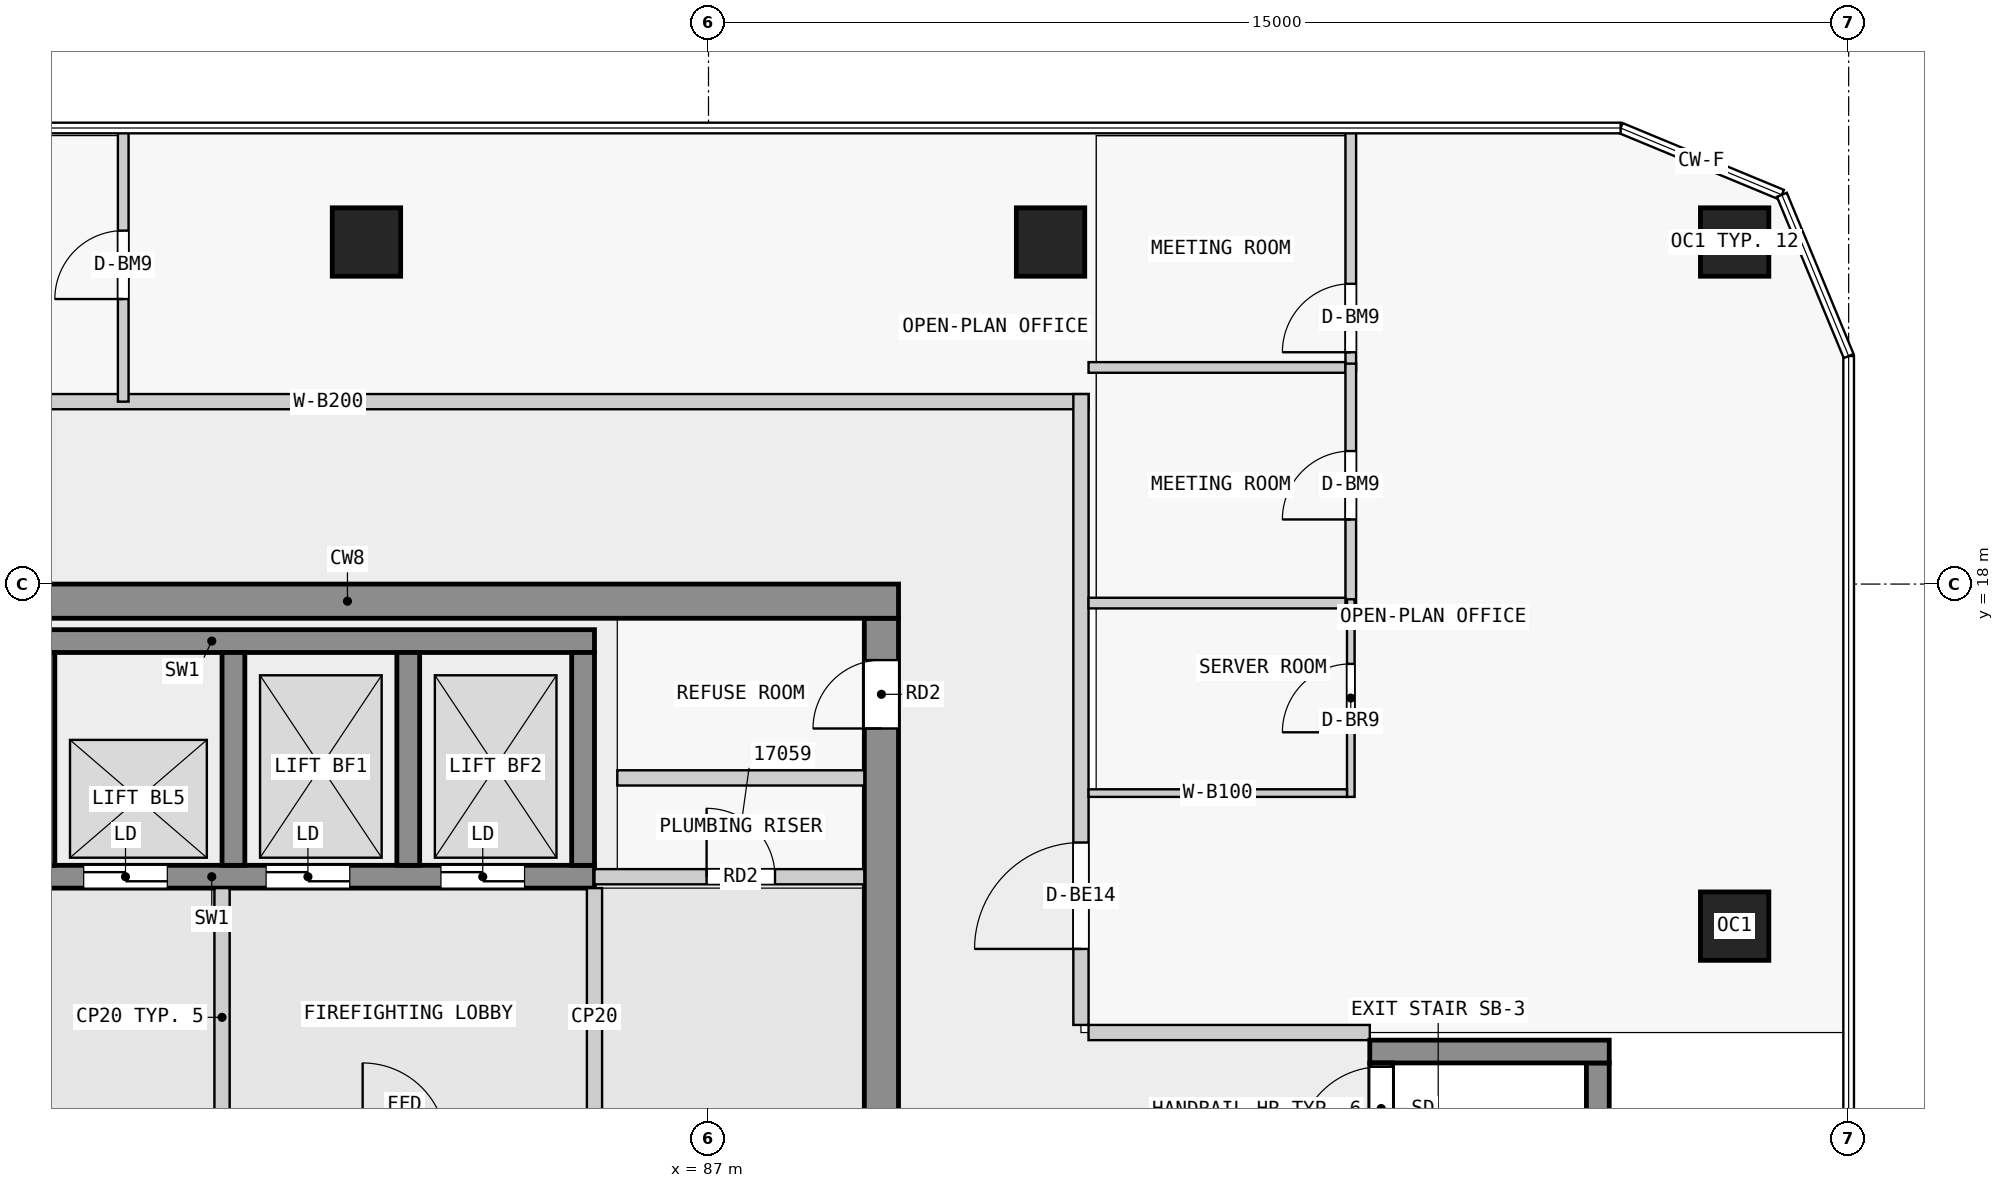
"""IFC4 building model, lengths in metres.
Left out: names, types, materials, properties, quantities, classifications, styles, units other than length and angle.
Written with IfcOpenShell. Run it as: python <this file> out.ifc"""

import sys

from ifc_helpers import new_model, si_unit, direction, frame, frame_2d, origin, origin_2d, place, context, subcontext, project, spatial, rectangle, extrude, element, fill, save


model = new_model("IFC4")
c1 = context("Model", 3, precision=1e-05, world=origin(), true_north=direction((0.0, 1.0)))
c2 = subcontext(c1, "Body", "Model", "MODEL_VIEW")
j1 = project(units=[si_unit("LENGTHUNIT", "METRE"), si_unit("PLANEANGLEUNIT", "RADIAN")], contexts=[c1])
p1 = place(None, origin())
s1 = spatial("IfcSite", under=j1, at=p1, CompositionType="ELEMENT")
p2 = place(p1, origin())
s2 = spatial("IfcBuilding", under=s1, at=p2, CompositionType="ELEMENT")
p3 = place(p2, frame((0.0, 0.0, 68.8)))
s3 = spatial("IfcBuildingStorey", under=s2, at=p3, CompositionType="ELEMENT", Elevation=68.8)
for number, where, z_axis, x_axis in (
    (1, (100.5, 13.5, 0.0), (0.0, 0.0, 1.0), (1.0, 0.0, 0.0)),
    (2, (100.5, 22.5, 0.0), (0.0, 0.0, 1.0), (1.0, 0.0, 0.0)),
    (3, (91.5, 22.5, 0.0), (0.0, 0.0, 1.0), (1.0, 0.0, 0.0)),
    (4, (82.5, 22.5, 0.0), (0.0, 0.0, 1.0), (1.0, 0.0, 0.0)),
):
    element("IfcColumn", number, at=place(p3, frame(where, z_axis=z_axis, x_axis=x_axis)), inside=s3, PredefinedType="COLUMN", context=c2, shape_type="SweptSolid", body=[
        extrude(rectangle(XDim=0.9, YDim=0.9, at=origin_2d()), origin(), (0.0, 0.0, 1.0), 3.5),
    ])
p4 = place(p3, frame((75.0, 17.775, 0.0), z_axis=(0.0, 0.0, 1.0), x_axis=(1.0, 0.0, 0.0)))
e5 = element("IfcWall", 5, at=p4, inside=s3, PredefinedType="SHEAR", context=c2, shape_type="SweptSolid", body=[
    extrude(rectangle(XDim=14.5, YDim=0.45, at=frame_2d((7.25, 0.0))), origin(), (0.0, 0.0, 1.0), 3.2),
])
p5 = place(p3, frame((89.275, 0.45, 0.0), z_axis=(0.0, 0.0, 1.0), x_axis=(0.0, 1.0, 0.0)))
e6 = element("IfcWall", 6, at=p5, inside=s3, PredefinedType="SHEAR", context=c2, shape_type="SweptSolid", body=[
    extrude(rectangle(XDim=17.1, YDim=0.45, at=frame_2d((8.55, 0.0))), origin(), (0.0, 0.0, 1.0), 3.2),
])
p6 = place(p5, frame((7.65, 0.0, 0.0)))
e7 = element("IfcOpeningElement", 7, at=p6, cuts=e6, PredefinedType="OPENING", context=c2, shape_type="SweptSolid", body=[
    extrude(rectangle(XDim=1.8, YDim=2.1, at=frame_2d((0.9, 1.05))), frame((0.0, 0.235, 0.0), z_axis=(0.0, -1.0, 0.0), x_axis=(1.0, 0.0, 0.0)), (0.0, 0.0, 1.0), 0.47),
])
p7 = place(p5, frame((15.65, 0.0, 0.0)))
e8 = element("IfcOpeningElement", 8, at=p7, cuts=e6, PredefinedType="OPENING", context=c2, shape_type="SweptSolid", body=[
    extrude(rectangle(XDim=0.9, YDim=2.1, at=frame_2d((0.45, 1.05))), frame((0.0, 0.235, 0.0), z_axis=(0.0, -1.0, 0.0), x_axis=(1.0, 0.0, 0.0)), (0.0, 0.0, 1.0), 0.47),
])
p8 = place(p3, frame((75.43, 17.25, 0.0), z_axis=(0.0, 0.0, 1.0), x_axis=(1.0, 0.0, 0.0)))
e9 = element("IfcWall", 9, at=p8, inside=s3, PredefinedType="SHEAR", context=c2, shape_type="SweptSolid", body=[
    extrude(rectangle(XDim=10.07, YDim=0.3, at=frame_2d((5.035, 0.0))), origin(), (0.0, 0.0, 1.0), 3.2),
])
p9 = place(p3, frame((75.43, 14.15, 0.0), z_axis=(0.0, 0.0, 1.0), x_axis=(1.0, 0.0, 0.0)))
e10 = element("IfcWall", 10, at=p9, inside=s3, PredefinedType="SHEAR", context=c2, shape_type="SweptSolid", body=[
    extrude(rectangle(XDim=10.07, YDim=0.3, at=frame_2d((5.035, 0.0))), origin(), (0.0, 0.0, 1.0), 3.2),
])
p10 = place(p9, frame((0.85, 0.0, 0.0)))
e11 = element("IfcOpeningElement", 11, at=p10, cuts=e10, PredefinedType="OPENING", context=c2, shape_type="SweptSolid", body=[
    extrude(rectangle(XDim=1.1, YDim=2.1, at=frame_2d((0.55, 1.05))), frame((0.0, 0.16, 0.0), z_axis=(0.0, -1.0, 0.0), x_axis=(1.0, 0.0, 0.0)), (0.0, 0.0, 1.0), 0.32),
])
p11 = place(p9, frame((3.35, 0.0, 0.0)))
e12 = element("IfcOpeningElement", 12, at=p11, cuts=e10, PredefinedType="OPENING", context=c2, shape_type="SweptSolid", body=[
    extrude(rectangle(XDim=1.1, YDim=2.1, at=frame_2d((0.55, 1.05))), frame((0.0, 0.16, 0.0), z_axis=(0.0, -1.0, 0.0), x_axis=(1.0, 0.0, 0.0)), (0.0, 0.0, 1.0), 0.32),
])
p12 = place(p9, frame((5.75, 0.0, 0.0)))
e13 = element("IfcOpeningElement", 13, at=p12, cuts=e10, PredefinedType="OPENING", context=c2, shape_type="SweptSolid", body=[
    extrude(rectangle(XDim=1.1, YDim=2.1, at=frame_2d((0.55, 1.05))), frame((0.0, 0.16, 0.0), z_axis=(0.0, -1.0, 0.0), x_axis=(1.0, 0.0, 0.0)), (0.0, 0.0, 1.0), 0.32),
])
p13 = place(p9, frame((8.05, 0.0, 0.0)))
e14 = element("IfcOpeningElement", 14, at=p13, cuts=e10, PredefinedType="OPENING", context=c2, shape_type="SweptSolid", body=[
    extrude(rectangle(XDim=1.1, YDim=2.1, at=frame_2d((0.55, 1.05))), frame((0.0, 0.16, 0.0), z_axis=(0.0, -1.0, 0.0), x_axis=(1.0, 0.0, 0.0)), (0.0, 0.0, 1.0), 0.32),
])
for number, where, z_axis, x_axis in (
    (15, (78.25, 14.3, 0.0), (0.0, 0.0, 1.0), (0.0, 1.0, 0.0)),
    (16, (80.75, 14.3, 0.0), (0.0, 0.0, 1.0), (0.0, 1.0, 0.0)),
    (17, (83.05, 14.3, 0.0), (0.0, 0.0, 1.0), (0.0, 1.0, 0.0)),
    (18, (85.35, 14.3, 0.0), (0.0, 0.0, 1.0), (0.0, 1.0, 0.0)),
):
    element("IfcWall", number, at=place(p3, frame(where, z_axis=z_axis, x_axis=x_axis)), inside=s3, PredefinedType="SHEAR", context=c2, shape_type="SweptSolid", body=[
        extrude(rectangle(XDim=2.8, YDim=0.3, at=frame_2d((1.4, 0.0))), origin(), (0.0, 0.0, 1.0), 3.2),
    ])
p14 = place(p3, frame((95.85, 5.3, 0.0), z_axis=(0.0, 0.0, 1.0), x_axis=(0.0, 1.0, 0.0)))
e19 = element("IfcWall", 19, at=p14, inside=s3, PredefinedType="SHEAR", context=c2, shape_type="SweptSolid", body=[
    extrude(rectangle(XDim=6.4, YDim=0.3, at=frame_2d((3.2, 0.0))), origin(), (0.0, 0.0, 1.0), 3.2),
])
p15 = place(p14, frame((5.25, 0.0, 0.0)))
e20 = element("IfcOpeningElement", 20, at=p15, cuts=e19, PredefinedType="OPENING", context=c2, shape_type="SweptSolid", body=[
    extrude(rectangle(XDim=1.1, YDim=2.1, at=frame_2d((0.55, 1.05))), frame((0.0, 0.16, 0.0), z_axis=(0.0, -1.0, 0.0), x_axis=(1.0, 0.0, 0.0)), (0.0, 0.0, 1.0), 0.32),
])
p16 = place(p3, frame((98.7, 5.3, 0.0), z_axis=(0.0, 0.0, 1.0), x_axis=(0.0, 1.0, 0.0)))
e21 = element("IfcWall", 21, at=p16, inside=s3, PredefinedType="SHEAR", context=c2, shape_type="SweptSolid", body=[
    extrude(rectangle(XDim=6.4, YDim=0.3, at=frame_2d((3.2, 0.0))), origin(), (0.0, 0.0, 1.0), 3.2),
])
p17 = place(p3, frame((95.7, 11.85, 0.0), z_axis=(0.0, 0.0, 1.0), x_axis=(1.0, 0.0, 0.0)))
e22 = element("IfcWall", 22, at=p17, inside=s3, PredefinedType="SHEAR", context=c2, shape_type="SweptSolid", body=[
    extrude(rectangle(XDim=3.15, YDim=0.3, at=frame_2d((1.575, 0.0))), origin(), (0.0, 0.0, 1.0), 3.2),
])
for number, where, z_axis, x_axis in (
    (23, (80.6, 10.6, 0.0), (0.0, 0.0, 1.0), (0.0, 1.0, 0.0)),
    (24, (85.5, 10.6, 0.0), (0.0, 0.0, 1.0), (0.0, 1.0, 0.0)),
):
    element("IfcWall", number, at=place(p3, frame(where, z_axis=z_axis, x_axis=x_axis)), inside=s3, PredefinedType="PARTITIONING", context=c2, shape_type="SweptSolid", body=[
        extrude(rectangle(XDim=3.4, YDim=0.2, at=frame_2d((1.7, 0.0))), origin(), (0.0, 0.0, 1.0), 3.2),
    ])
p18 = place(p3, frame((85.5, 14.15, 0.0), z_axis=(0.0, 0.0, 1.0), x_axis=(1.0, 0.0, 0.0)))
e25 = element("IfcWall", 25, at=p18, inside=s3, PredefinedType="PARTITIONING", context=c2, shape_type="SweptSolid", body=[
    extrude(rectangle(XDim=3.55, YDim=0.2, at=frame_2d((1.775, 0.0))), origin(), (0.0, 0.0, 1.0), 3.2),
])
p19 = place(p18, frame((1.475, 0.0, 0.0)))
e26 = element("IfcOpeningElement", 26, at=p19, cuts=e25, PredefinedType="OPENING", context=c2, shape_type="SweptSolid", body=[
    extrude(rectangle(XDim=0.9, YDim=2.1, at=frame_2d((0.45, 1.05))), frame((0.0, 0.11, 0.0), z_axis=(0.0, -1.0, 0.0), x_axis=(1.0, 0.0, 0.0)), (0.0, 0.0, 1.0), 0.22),
])
p20 = place(p3, frame((85.8, 15.45, 0.0), z_axis=(0.0, 0.0, 1.0), x_axis=(1.0, 0.0, 0.0)))
e27 = element("IfcWall", 27, at=p20, inside=s3, PredefinedType="PARTITIONING", context=c2, shape_type="SweptSolid", body=[
    extrude(rectangle(XDim=3.25, YDim=0.2, at=frame_2d((1.625, 0.0))), origin(), (0.0, 0.0, 1.0), 3.2),
])
p21 = place(p3, frame((72.0, 20.4, 0.0), z_axis=(0.0, 0.0, 1.0), x_axis=(1.0, 0.0, 0.0)))
e28 = element("IfcWall", 28, at=p21, inside=s3, PredefinedType="PARTITIONING", context=c2, shape_type="SweptSolid", body=[
    extrude(rectangle(XDim=20.0, YDim=0.2, at=frame_2d((10.0, 0.0))), origin(), (0.0, 0.0, 1.0), 3.2),
])
p22 = place(p3, frame((91.9, 12.2, 0.0), z_axis=(0.0, 0.0, 1.0), x_axis=(0.0, 1.0, 0.0)))
e29 = element("IfcWall", 29, at=p22, inside=s3, PredefinedType="PARTITIONING", context=c2, shape_type="SweptSolid", body=[
    extrude(rectangle(XDim=8.3, YDim=0.2, at=frame_2d((4.15, 0.0))), origin(), (0.0, 0.0, 1.0), 3.2),
])
p23 = place(p22, frame((1.0, 0.0, 0.0)))
e30 = element("IfcOpeningElement", 30, at=p23, cuts=e29, PredefinedType="OPENING", context=c2, shape_type="SweptSolid", body=[
    extrude(rectangle(XDim=1.4, YDim=2.4, at=frame_2d((0.7, 1.2))), frame((0.0, 0.11, 0.0), z_axis=(0.0, -1.0, 0.0), x_axis=(1.0, 0.0, 0.0)), (0.0, 0.0, 1.0), 0.22),
])
p24 = place(p3, frame((92.0, 12.1, 0.0), z_axis=(0.0, 0.0, 1.0), x_axis=(1.0, 0.0, 0.0)))
e31 = element("IfcWall", 31, at=p24, inside=s3, PredefinedType="PARTITIONING", context=c2, shape_type="SweptSolid", body=[
    extrude(rectangle(XDim=3.7, YDim=0.2, at=frame_2d((1.85, 0.0))), origin(), (0.0, 0.0, 1.0), 3.2),
])
p25 = place(p3, frame((95.45, 20.8, 0.0), z_axis=(0.0, 0.0, 1.0), x_axis=(0.0, 1.0, 0.0)))
e32 = element("IfcWall", 32, at=p25, inside=s3, PredefinedType="PARTITIONING", context=c2, shape_type="SweptSolid", body=[
    extrude(rectangle(XDim=3.2, YDim=0.14, at=frame_2d((1.6, 0.0))), origin(), (0.0, 0.0, 1.0), 3.2),
])
p26 = place(p25, frame((0.25, 0.0, 0.0)))
e33 = element("IfcOpeningElement", 33, at=p26, cuts=e32, PredefinedType="OPENING", context=c2, shape_type="SweptSolid", body=[
    extrude(rectangle(XDim=0.9, YDim=2.4, at=frame_2d((0.45, 1.2))), frame((0.0, 0.08, 0.0), z_axis=(0.0, -1.0, 0.0), x_axis=(1.0, 0.0, 0.0)), (0.0, 0.0, 1.0), 0.16),
])
p27 = place(p3, frame((92.0, 20.85, 0.0), z_axis=(0.0, 0.0, 1.0), x_axis=(1.0, 0.0, 0.0)))
e34 = element("IfcWall", 34, at=p27, inside=s3, PredefinedType="PARTITIONING", context=c2, shape_type="SweptSolid", body=[
    extrude(rectangle(XDim=3.38, YDim=0.14, at=frame_2d((1.69, 0.0))), origin(), (0.0, 0.0, 1.0), 3.2),
])
p28 = place(p3, frame((95.45, 17.7, 0.0), z_axis=(0.0, 0.0, 1.0), x_axis=(0.0, 1.0, 0.0)))
e35 = element("IfcWall", 35, at=p28, inside=s3, PredefinedType="PARTITIONING", context=c2, shape_type="SweptSolid", body=[
    extrude(rectangle(XDim=3.2, YDim=0.14, at=frame_2d((1.6, 0.0))), origin(), (0.0, 0.0, 1.0), 3.2),
])
p29 = place(p28, frame((1.15, 0.0, 0.0)))
e36 = element("IfcOpeningElement", 36, at=p29, cuts=e35, PredefinedType="OPENING", context=c2, shape_type="SweptSolid", body=[
    extrude(rectangle(XDim=0.9, YDim=2.4, at=frame_2d((0.45, 1.2))), frame((0.0, 0.08, 0.0), z_axis=(0.0, -1.0, 0.0), x_axis=(1.0, 0.0, 0.0)), (0.0, 0.0, 1.0), 0.16),
])
p30 = place(p3, frame((92.0, 17.75, 0.0), z_axis=(0.0, 0.0, 1.0), x_axis=(1.0, 0.0, 0.0)))
e37 = element("IfcWall", 37, at=p30, inside=s3, PredefinedType="PARTITIONING", context=c2, shape_type="SweptSolid", body=[
    extrude(rectangle(XDim=3.38, YDim=0.14, at=frame_2d((1.69, 0.0))), origin(), (0.0, 0.0, 1.0), 3.2),
])
p31 = place(p3, frame((95.45, 15.2, 0.0), z_axis=(0.0, 0.0, 1.0), x_axis=(0.0, 1.0, 0.0)))
e38 = element("IfcWall", 38, at=p31, inside=s3, PredefinedType="PARTITIONING", context=c2, shape_type="SweptSolid", body=[
    extrude(rectangle(XDim=2.6, YDim=0.1, at=frame_2d((1.3, 0.0))), origin(), (0.0, 0.0, 1.0), 3.2),
])
p32 = place(p31, frame((0.85, 0.0, 0.0)))
e39 = element("IfcOpeningElement", 39, at=p32, cuts=e38, PredefinedType="OPENING", context=c2, shape_type="SweptSolid", body=[
    extrude(rectangle(XDim=0.9, YDim=2.1, at=frame_2d((0.45, 1.05))), frame((0.0, 0.06, 0.0), z_axis=(0.0, -1.0, 0.0), x_axis=(1.0, 0.0, 0.0)), (0.0, 0.0, 1.0), 0.12),
])
p33 = place(p3, frame((92.0, 15.25, 0.0), z_axis=(0.0, 0.0, 1.0), x_axis=(1.0, 0.0, 0.0)))
e40 = element("IfcWall", 40, at=p33, inside=s3, PredefinedType="PARTITIONING", context=c2, shape_type="SweptSolid", body=[
    extrude(rectangle(XDim=3.4, YDim=0.1, at=frame_2d((1.7, 0.0))), origin(), (0.0, 0.0, 1.0), 3.2),
])
p34 = place(p3, frame((79.3, 20.4, 0.0), z_axis=(0.0, 0.0, 1.0), x_axis=(0.0, 1.0, 0.0)))
e41 = element("IfcWall", 41, at=p34, inside=s3, PredefinedType="PARTITIONING", context=c2, shape_type="SweptSolid", body=[
    extrude(rectangle(XDim=3.6, YDim=0.14, at=frame_2d((1.8, 0.0))), origin(), (0.0, 0.0, 1.0), 3.2),
])
p35 = place(p34, frame((1.35, 0.0, 0.0)))
e42 = element("IfcOpeningElement", 42, at=p35, cuts=e41, PredefinedType="OPENING", context=c2, shape_type="SweptSolid", body=[
    extrude(rectangle(XDim=0.9, YDim=2.4, at=frame_2d((0.45, 1.2))), frame((0.0, 0.08, 0.0), z_axis=(0.0, -1.0, 0.0), x_axis=(1.0, 0.0, 0.0)), (0.0, 0.0, 1.0), 0.16),
])
p36 = place(p11, origin())
e43 = element("IfcDoor", 43, at=p36, inside=s3, OperationType="DOUBLE_DOOR_SLIDING", PredefinedType="DOOR", context=c2, shape_type="SweptSolid", body=[
    extrude(rectangle(XDim=1.1, YDim=2.1, at=frame_2d((0.55, 1.05))), frame((0.0, 0.025, 0.0), z_axis=(0.0, -1.0, 0.0), x_axis=(1.0, 0.0, 0.0)), (0.0, 0.0, 1.0), 0.05),
])
fill(e12, e43)
p37 = place(p12, origin())
e44 = element("IfcDoor", 44, at=p37, inside=s3, OperationType="DOUBLE_DOOR_SLIDING", PredefinedType="DOOR", context=c2, shape_type="SweptSolid", body=[
    extrude(rectangle(XDim=1.1, YDim=2.1, at=frame_2d((0.55, 1.05))), frame((0.0, 0.025, 0.0), z_axis=(0.0, -1.0, 0.0), x_axis=(1.0, 0.0, 0.0)), (0.0, 0.0, 1.0), 0.05),
])
fill(e13, e44)
p38 = place(p13, origin())
e45 = element("IfcDoor", 45, at=p38, inside=s3, OperationType="DOUBLE_DOOR_SLIDING", PredefinedType="DOOR", context=c2, shape_type="SweptSolid", body=[
    extrude(rectangle(XDim=1.1, YDim=2.1, at=frame_2d((0.55, 1.05))), frame((0.0, 0.025, 0.0), z_axis=(0.0, -1.0, 0.0), x_axis=(1.0, 0.0, 0.0)), (0.0, 0.0, 1.0), 0.05),
])
fill(e14, e45)
p39 = place(p15, origin())
e46 = element("IfcDoor", 46, at=p39, inside=s3, OperationType="SINGLE_SWING_LEFT", PredefinedType="DOOR", context=c2, shape_type="SweptSolid", body=[
    extrude(rectangle(XDim=1.1, YDim=2.1, at=frame_2d((0.55, 1.05))), frame((0.0, 0.025, 0.0), z_axis=(0.0, -1.0, 0.0), x_axis=(1.0, 0.0, 0.0)), (0.0, 0.0, 1.0), 0.05),
])
fill(e20, e46)
p40 = place(p19, origin())
e47 = element("IfcDoor", 47, at=p40, inside=s3, OperationType="SINGLE_SWING_LEFT", PredefinedType="DOOR", context=c2, shape_type="SweptSolid", body=[
    extrude(rectangle(XDim=0.9, YDim=2.1, at=frame_2d((0.45, 1.05))), frame((0.0, 0.025, 0.0), z_axis=(0.0, -1.0, 0.0), x_axis=(1.0, 0.0, 0.0)), (0.0, 0.0, 1.0), 0.05),
])
fill(e26, e47)
p41 = place(p7, origin())
e48 = element("IfcDoor", 48, at=p41, inside=s3, OperationType="SINGLE_SWING_LEFT", PredefinedType="DOOR", context=c2, shape_type="SweptSolid", body=[
    extrude(rectangle(XDim=0.9, YDim=2.1, at=frame_2d((0.45, 1.05))), frame((0.0, 0.025, 0.0), z_axis=(0.0, -1.0, 0.0), x_axis=(1.0, 0.0, 0.0)), (0.0, 0.0, 1.0), 0.05),
])
fill(e8, e48)
p42 = place(p23, origin())
e49 = element("IfcDoor", 49, at=p42, inside=s3, OperationType="DOUBLE_DOOR_SINGLE_SWING", PredefinedType="DOOR", context=c2, shape_type="SweptSolid", body=[
    extrude(rectangle(XDim=1.4, YDim=2.4, at=frame_2d((0.7, 1.2))), frame((0.0, 0.025, 0.0), z_axis=(0.0, -1.0, 0.0), x_axis=(1.0, 0.0, 0.0)), (0.0, 0.0, 1.0), 0.05),
])
fill(e30, e49)
p43 = place(p26, origin())
e50 = element("IfcDoor", 50, at=p43, inside=s3, OperationType="SINGLE_SWING_LEFT", PredefinedType="DOOR", context=c2, shape_type="SweptSolid", body=[
    extrude(rectangle(XDim=0.9, YDim=2.4, at=frame_2d((0.45, 1.2))), frame((0.0, 0.025, 0.0), z_axis=(0.0, -1.0, 0.0), x_axis=(1.0, 0.0, 0.0)), (0.0, 0.0, 1.0), 0.05),
])
fill(e33, e50)
p44 = place(p29, origin())
e51 = element("IfcDoor", 51, at=p44, inside=s3, OperationType="SINGLE_SWING_LEFT", PredefinedType="DOOR", context=c2, shape_type="SweptSolid", body=[
    extrude(rectangle(XDim=0.9, YDim=2.4, at=frame_2d((0.45, 1.2))), frame((0.0, 0.025, 0.0), z_axis=(0.0, -1.0, 0.0), x_axis=(1.0, 0.0, 0.0)), (0.0, 0.0, 1.0), 0.05),
])
fill(e36, e51)
p45 = place(p32, origin())
e52 = element("IfcDoor", 52, at=p45, inside=s3, OperationType="SINGLE_SWING_LEFT", PredefinedType="DOOR", context=c2, shape_type="SweptSolid", body=[
    extrude(rectangle(XDim=0.9, YDim=2.1, at=frame_2d((0.45, 1.05))), frame((0.0, 0.025, 0.0), z_axis=(0.0, -1.0, 0.0), x_axis=(1.0, 0.0, 0.0)), (0.0, 0.0, 1.0), 0.05),
])
fill(e39, e52)
p46 = place(p35, origin())
e53 = element("IfcDoor", 53, at=p46, inside=s3, OperationType="SINGLE_SWING_LEFT", PredefinedType="DOOR", context=c2, shape_type="SweptSolid", body=[
    extrude(rectangle(XDim=0.9, YDim=2.4, at=frame_2d((0.45, 1.2))), frame((0.0, 0.025, 0.0), z_axis=(0.0, -1.0, 0.0), x_axis=(1.0, 0.0, 0.0)), (0.0, 0.0, 1.0), 0.05),
])
fill(e42, e53)
save(model, sys.argv[1])
